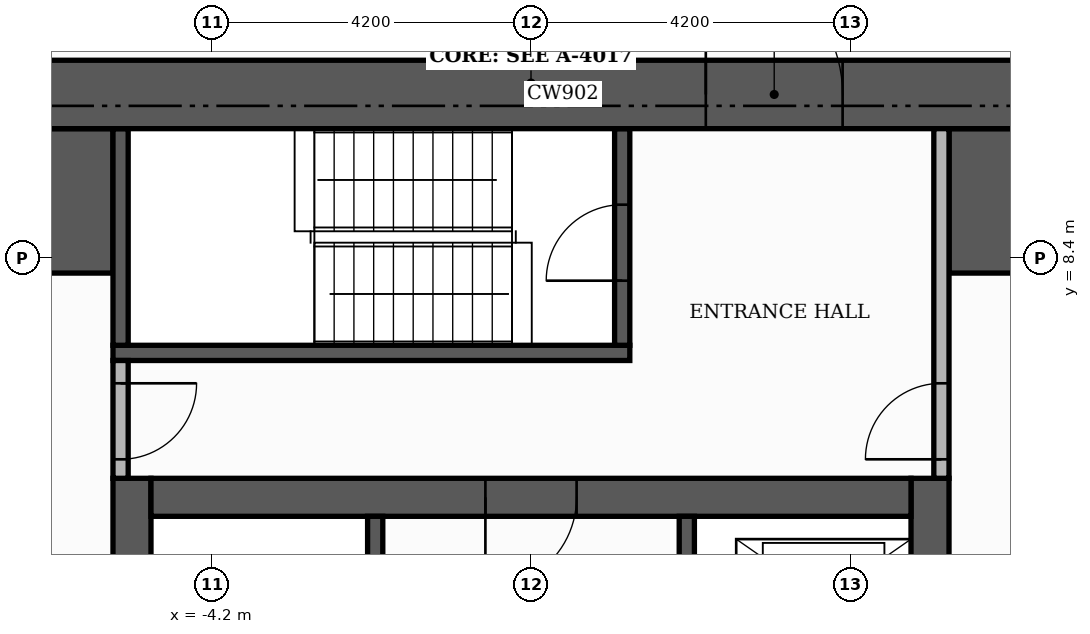
"""IFC4 building model, lengths in metres.
Left out: names, types, materials, properties, quantities, classifications, styles, units other than length and angle.
Written with IfcOpenShell. Run it as: python <this file> out.ifc"""

import sys

from ifc_helpers import new_model, si_unit, direction, frame, frame_2d, origin, place, context, subcontext, project, spatial, rectangle, extrude, element, fill, save


model = new_model("IFC4")
c1 = context("Model", 3, precision=1e-05, world=origin(), true_north=direction((0.0, 1.0)))
c2 = subcontext(c1, "Body", "Model", "MODEL_VIEW")
j1 = project(units=[si_unit("LENGTHUNIT", "METRE"), si_unit("PLANEANGLEUNIT", "RADIAN")], contexts=[c1])
p1 = place(None, origin())
s1 = spatial("IfcSite", under=j1, at=p1, CompositionType="ELEMENT")
p2 = place(p1, origin())
s2 = spatial("IfcBuilding", under=s1, at=p2, CompositionType="ELEMENT")
p3 = place(p2, frame((0.0, 0.0, 110.4)))
s3 = spatial("IfcBuildingStorey", under=s2, at=p3, CompositionType="ELEMENT", Elevation=110.4)
for number, where, z_axis, x_axis in (
    (1, (-5.25, -5.0, 0.0), (0.0, 0.0, 1.0), (0.0, 1.0, 0.0)),
    (2, (5.25, -5.0, 0.0), (0.0, 0.0, 1.0), (0.0, 1.0, 0.0)),
):
    element("IfcWall", number, at=place(p3, frame(where, z_axis=z_axis, x_axis=x_axis)), inside=s3, PredefinedType="SHEAR", context=c2, shape_type="SweptSolid", body=[
        extrude(rectangle(XDim=10.5, YDim=0.5, at=frame_2d((5.25, 0.0))), origin(), (0.0, 0.0, 1.0), 3.48),
    ])
p4 = place(p3, frame((-5.0, 5.25, 0.0), z_axis=(0.0, 0.0, 1.0), x_axis=(1.0, 0.0, 0.0)))
e3 = element("IfcWall", 3, at=p4, inside=s3, PredefinedType="SHEAR", context=c2, shape_type="SweptSolid", body=[
    extrude(rectangle(XDim=10.0, YDim=0.5, at=frame_2d((5.0, 0.0))), origin(), (0.0, 0.0, 1.0), 3.48),
])
p5 = place(p4, frame((4.4, 0.0, 0.0)))
e4 = element("IfcOpeningElement", 4, at=p5, cuts=e3, PredefinedType="OPENING", context=c2, shape_type="SweptSolid", body=[
    extrude(rectangle(XDim=1.2, YDim=2.1, at=frame_2d((0.6, 1.05))), frame((0.0, 0.26, 0.0), z_axis=(0.0, -1.0, 0.0), x_axis=(1.0, 0.0, 0.0)), (0.0, 0.0, 1.0), 0.52),
])
for number, where, z_axis, x_axis in (
    (5, (-10.1, 9.15, 0.0), (0.0, 0.0, 1.0), (1.0, 0.0, 0.0)),
    (6, (5.5, 9.15, 0.0), (0.0, 0.0, 1.0), (1.0, 0.0, 0.0)),
):
    element("IfcWall", number, at=place(p3, frame(where, z_axis=z_axis, x_axis=x_axis)), inside=s3, PredefinedType="SHEAR", context=c2, shape_type="SweptSolid", body=[
        extrude(rectangle(XDim=4.6, YDim=1.9, at=frame_2d((2.3, 0.0))), origin(), (0.0, 0.0, 1.0), 3.48),
    ])
p6 = place(p3, frame((-2.05, -1.4, 0.0), z_axis=(0.0, 0.0, 1.0), x_axis=(0.0, 1.0, 0.0)))
e7 = element("IfcWall", 7, at=p6, inside=s3, PredefinedType="SHEAR", context=c2, shape_type="SweptSolid", body=[
    extrude(rectangle(XDim=6.4, YDim=0.2, at=frame_2d((3.2, 0.0))), origin(), (0.0, 0.0, 1.0), 3.48),
])
p7 = place(p6, frame((0.15, 0.0, 0.0)))
e8 = element("IfcOpeningElement", 8, at=p7, cuts=e7, PredefinedType="OPENING", context=c2, shape_type="SweptSolid", body=[
    extrude(rectangle(XDim=1.0, YDim=2.1, at=frame_2d((0.5, 1.05))), frame((0.0, 0.11, 0.0), z_axis=(0.0, -1.0, 0.0), x_axis=(1.0, 0.0, 0.0)), (0.0, 0.0, 1.0), 0.22),
])
p8 = place(p3, frame((-5.5, 7.15, 0.0), z_axis=(0.0, 0.0, 1.0), x_axis=(1.0, 0.0, 0.0)))
e9 = element("IfcWall", 9, at=p8, inside=s3, PredefinedType="SHEAR", context=c2, shape_type="SweptSolid", body=[
    extrude(rectangle(XDim=6.8, YDim=0.2, at=frame_2d((3.4, 0.0))), origin(), (0.0, 0.0, 1.0), 3.48),
])
p9 = place(p3, frame((-5.4, 7.25, 0.0), z_axis=(0.0, 0.0, 1.0), x_axis=(0.0, 1.0, 0.0)))
e10 = element("IfcWall", 10, at=p9, inside=s3, PredefinedType="SHEAR", context=c2, shape_type="SweptSolid", body=[
    extrude(rectangle(XDim=2.85, YDim=0.2, at=frame_2d((1.425, 0.0))), origin(), (0.0, 0.0, 1.0), 3.48),
])
p10 = place(p3, frame((1.2, 7.25, 0.0), z_axis=(0.0, 0.0, 1.0), x_axis=(0.0, 1.0, 0.0)))
e11 = element("IfcWall", 11, at=p10, inside=s3, PredefinedType="SHEAR", context=c2, shape_type="SweptSolid", body=[
    extrude(rectangle(XDim=2.85, YDim=0.2, at=frame_2d((1.425, 0.0))), origin(), (0.0, 0.0, 1.0), 3.48),
])
p11 = place(p10, frame((0.85, 0.0, 0.0)))
e12 = element("IfcOpeningElement", 12, at=p11, cuts=e11, PredefinedType="OPENING", context=c2, shape_type="SweptSolid", body=[
    extrude(rectangle(XDim=1.0, YDim=2.1, at=frame_2d((0.5, 1.05))), frame((0.0, 0.11, 0.0), z_axis=(0.0, -1.0, 0.0), x_axis=(1.0, 0.0, 0.0)), (0.0, 0.0, 1.0), 0.22),
])
p12 = place(p3, frame((2.05, 1.6, 0.0), z_axis=(0.0, 0.0, 1.0), x_axis=(0.0, 1.0, 0.0)))
e13 = element("IfcWall", 13, at=p12, inside=s3, PredefinedType="SHEAR", context=c2, shape_type="SweptSolid", body=[
    extrude(rectangle(XDim=3.4, YDim=0.2, at=frame_2d((1.7, 0.0))), origin(), (0.0, 0.0, 1.0), 3.48),
])
p13 = place(p12, frame((1.75, 0.0, 0.0)))
e14 = element("IfcOpeningElement", 14, at=p13, cuts=e13, PredefinedType="OPENING", context=c2, shape_type="SweptSolid", body=[
    extrude(rectangle(XDim=1.1, YDim=2.1, at=frame_2d((0.55, 1.05))), frame((0.0, 0.11, 0.0), z_axis=(0.0, -1.0, 0.0), x_axis=(1.0, 0.0, 0.0)), (0.0, 0.0, 1.0), 0.22),
])
p14 = place(p12, frame((0.15, 0.0, 0.0)))
e15 = element("IfcOpeningElement", 15, at=p14, cuts=e13, PredefinedType="OPENING", context=c2, shape_type="SweptSolid", body=[
    extrude(rectangle(XDim=0.8, YDim=2.1, at=frame_2d((0.4, 1.05))), frame((0.0, 0.11, 0.0), z_axis=(0.0, -1.0, 0.0), x_axis=(1.0, 0.0, 0.0)), (0.0, 0.0, 1.0), 0.22),
])
p15 = place(p3, frame((-11.0, 10.55, 0.0), z_axis=(0.0, 0.0, 1.0), x_axis=(1.0, 0.0, 0.0)))
e16 = element("IfcWall", 16, at=p15, inside=s3, PredefinedType="SHEAR", context=c2, shape_type="SweptSolid", body=[
    extrude(rectangle(XDim=22.0, YDim=0.9, at=frame_2d((11.0, 0.0))), origin(), (0.0, 0.0, 1.0), 3.48),
])
p16 = place(p15, frame((13.3, 0.0, 0.0)))
e17 = element("IfcOpeningElement", 17, at=p16, cuts=e16, PredefinedType="OPENING", context=c2, shape_type="SweptSolid", body=[
    extrude(rectangle(XDim=1.8, YDim=2.2, at=frame_2d((0.9, 1.1))), frame((0.0, 0.46, 0.0), z_axis=(0.0, -1.0, 0.0), x_axis=(1.0, 0.0, 0.0)), (0.0, 0.0, 1.0), 0.92),
])
p17 = place(p3, frame((-5.4, 5.5, 0.0), z_axis=(0.0, 0.0, 1.0), x_axis=(0.0, 1.0, 0.0)))
e18 = element("IfcWall", 18, at=p17, inside=s3, PredefinedType="PARTITIONING", context=c2, shape_type="SweptSolid", body=[
    extrude(rectangle(XDim=1.55, YDim=0.2, at=frame_2d((0.775, 0.0))), origin(), (0.0, 0.0, 1.0), 3.48),
])
p18 = place(p17, frame((0.25, 0.0, 0.0)))
e19 = element("IfcOpeningElement", 19, at=p18, cuts=e18, PredefinedType="OPENING", context=c2, shape_type="SweptSolid", body=[
    extrude(rectangle(XDim=1.0, YDim=2.1, at=frame_2d((0.5, 1.05))), frame((0.0, 0.11, 0.0), z_axis=(0.0, -1.0, 0.0), x_axis=(1.0, 0.0, 0.0)), (0.0, 0.0, 1.0), 0.22),
])
p19 = place(p3, frame((5.4, 5.5, 0.0), z_axis=(0.0, 0.0, 1.0), x_axis=(0.0, 1.0, 0.0)))
e20 = element("IfcWall", 20, at=p19, inside=s3, PredefinedType="PARTITIONING", context=c2, shape_type="SweptSolid", body=[
    extrude(rectangle(XDim=4.6, YDim=0.2, at=frame_2d((2.3, 0.0))), origin(), (0.0, 0.0, 1.0), 3.48),
])
p20 = place(p19, frame((0.25, 0.0, 0.0)))
e21 = element("IfcOpeningElement", 21, at=p20, cuts=e20, PredefinedType="OPENING", context=c2, shape_type="SweptSolid", body=[
    extrude(rectangle(XDim=1.0, YDim=2.1, at=frame_2d((0.5, 1.05))), frame((0.0, 0.11, 0.0), z_axis=(0.0, -1.0, 0.0), x_axis=(1.0, 0.0, 0.0)), (0.0, 0.0, 1.0), 0.22),
])
p21 = place(p5, frame((1.2, 0.0, 0.0), z_axis=(0.0, 0.0, 1.0), x_axis=(-1.0, 0.0, 0.0)))
e22 = element("IfcDoor", 22, at=p21, inside=s3, OperationType="SINGLE_SWING_LEFT", PredefinedType="DOOR", context=c2, shape_type="SweptSolid", body=[
    extrude(rectangle(XDim=1.2, YDim=2.1, at=frame_2d((0.6, 1.05))), frame((0.0, 0.025, 0.0), z_axis=(0.0, -1.0, 0.0), x_axis=(1.0, 0.0, 0.0)), (0.0, 0.0, 1.0), 0.05),
])
fill(e4, e22)
p22 = place(p11, origin())
e23 = element("IfcDoor", 23, at=p22, inside=s3, OperationType="SINGLE_SWING_LEFT", PredefinedType="DOOR", context=c2, shape_type="SweptSolid", body=[
    extrude(rectangle(XDim=1.0, YDim=2.1, at=frame_2d((0.5, 1.05))), frame((0.0, 0.025, 0.0), z_axis=(0.0, -1.0, 0.0), x_axis=(1.0, 0.0, 0.0)), (0.0, 0.0, 1.0), 0.05),
])
fill(e12, e23)
p23 = place(p18, frame((1.0, 0.0, 0.0), z_axis=(0.0, 0.0, 1.0), x_axis=(-1.0, 0.0, 0.0)))
e24 = element("IfcDoor", 24, at=p23, inside=s3, OperationType="SINGLE_SWING_RIGHT", PredefinedType="DOOR", context=c2, shape_type="SweptSolid", body=[
    extrude(rectangle(XDim=1.0, YDim=2.1, at=frame_2d((0.5, 1.05))), frame((0.0, 0.025, 0.0), z_axis=(0.0, -1.0, 0.0), x_axis=(1.0, 0.0, 0.0)), (0.0, 0.0, 1.0), 0.05),
])
fill(e19, e24)
p24 = place(p20, origin())
e25 = element("IfcDoor", 25, at=p24, inside=s3, OperationType="SINGLE_SWING_LEFT", PredefinedType="DOOR", context=c2, shape_type="SweptSolid", body=[
    extrude(rectangle(XDim=1.0, YDim=2.1, at=frame_2d((0.5, 1.05))), frame((0.0, 0.025, 0.0), z_axis=(0.0, -1.0, 0.0), x_axis=(1.0, 0.0, 0.0)), (0.0, 0.0, 1.0), 0.05),
])
fill(e21, e25)
p25 = place(p16, origin())
e26 = element("IfcDoor", 26, at=p25, inside=s3, OperationType="DOUBLE_DOOR_SINGLE_SWING", PredefinedType="DOOR", context=c2, shape_type="SweptSolid", body=[
    extrude(rectangle(XDim=1.8, YDim=2.2, at=frame_2d((0.9, 1.1))), frame((0.0, 0.025, 0.0), z_axis=(0.0, -1.0, 0.0), x_axis=(1.0, 0.0, 0.0)), (0.0, 0.0, 1.0), 0.05),
])
fill(e17, e26)
save(model, sys.argv[1])
